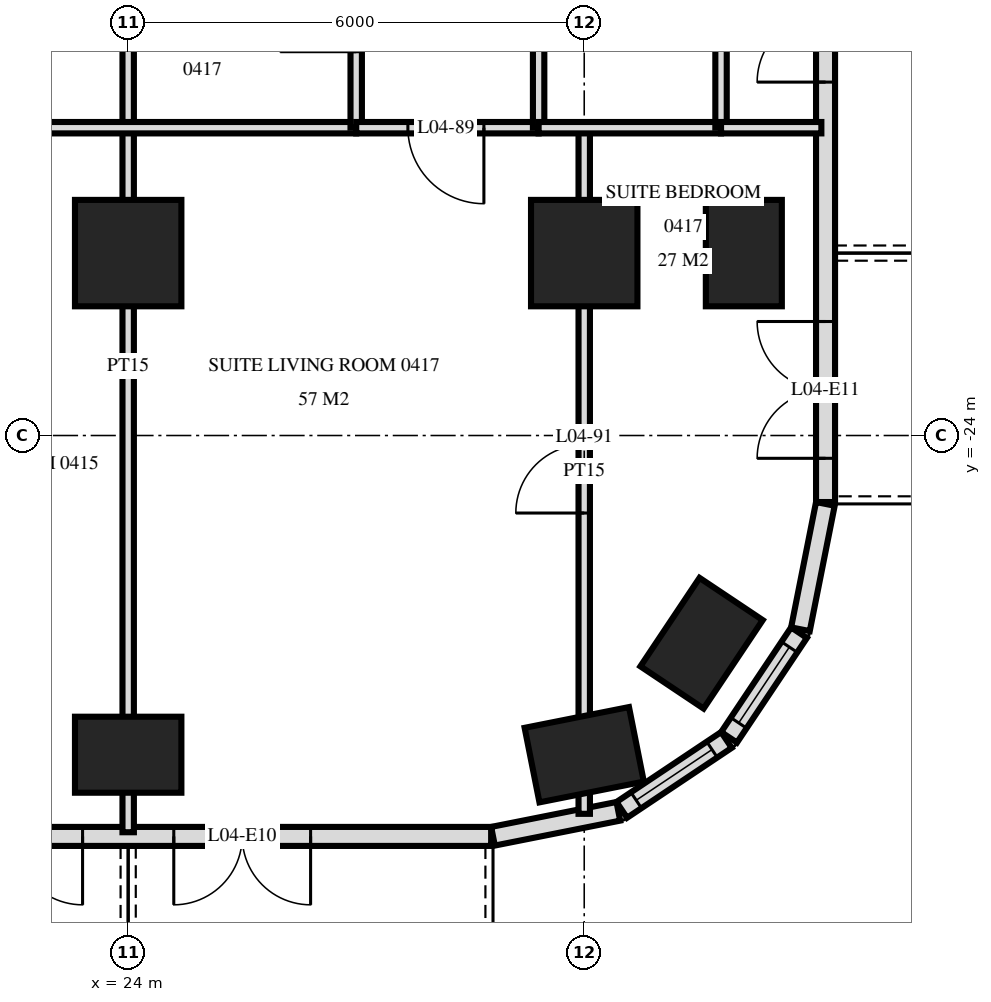
"""IFC4 building model, lengths in metres.
Left out: names, types, materials, properties, quantities, classifications, styles, units other than length and angle.
Written with IfcOpenShell. Run it as: python <this file> out.ifc"""

import sys

from ifc_helpers import new_model, si_unit, direction, frame, frame_2d, origin, origin_2d, place, context, subcontext, project, spatial, rectangle, extrude, element, fill, save


model = new_model("IFC4")
c1 = context("Model", 3, precision=1e-05, world=origin(), true_north=direction((0.0, 1.0)))
c2 = subcontext(c1, "Body", "Model", "MODEL_VIEW")
j1 = project(units=[si_unit("LENGTHUNIT", "METRE"), si_unit("PLANEANGLEUNIT", "RADIAN")], contexts=[c1])
p1 = place(None, origin())
s1 = spatial("IfcSite", under=j1, at=p1, CompositionType="ELEMENT")
p2 = place(p1, origin())
s2 = spatial("IfcBuilding", under=s1, at=p2, CompositionType="ELEMENT")
p3 = place(p2, frame((0.0, 0.0, 24.0)))
s3 = spatial("IfcBuildingStorey", under=s2, at=p3, CompositionType="ELEMENT", Elevation=24.0)
p4 = place(p3, frame((24.0, -28.2, -0.28), z_axis=(0.0, 0.0, 1.0), x_axis=(1.0, 0.0, 0.0)))
e1 = element("IfcColumn", 1, at=p4, inside=s3, PredefinedType="COLUMN", context=c2, shape_type="SweptSolid", body=[
    extrude(rectangle(XDim=1.4, YDim=1.0, at=origin_2d()), origin(), (0.0, 0.0, 1.0), 3.88),
])
p5 = place(p3, frame((24.0, -21.6, -0.28), z_axis=(0.0, 0.0, 1.0), x_axis=(1.0, 0.0, 0.0)))
e2 = element("IfcColumn", 2, at=p5, inside=s3, PredefinedType="COLUMN", context=c2, shape_type="SweptSolid", body=[
    extrude(rectangle(XDim=1.4, YDim=1.4, at=origin_2d()), origin(), (0.0, 0.0, 1.0), 3.88),
])
p6 = place(p3, frame((30.0, -28.2, -0.28), z_axis=(0.0, 0.0, 1.0), x_axis=(0.980792089743, 0.195056086032, 0.0)))
e3 = element("IfcColumn", 3, at=p6, inside=s3, PredefinedType="COLUMN", context=c2, shape_type="SweptSolid", body=[
    extrude(rectangle(XDim=1.4, YDim=1.0, at=origin_2d()), origin(), (0.0, 0.0, 1.0), 3.88),
])
p7 = place(p3, frame((30.0, -21.6, -0.28), z_axis=(0.0, 0.0, 1.0), x_axis=(1.0, 0.0, 0.0)))
e4 = element("IfcColumn", 4, at=p7, inside=s3, PredefinedType="COLUMN", context=c2, shape_type="SweptSolid", body=[
    extrude(rectangle(XDim=1.4, YDim=1.4, at=origin_2d()), origin(), (0.0, 0.0, 1.0), 3.88),
])
for number, where, z_axis, x_axis in (
    (5, (31.544, -26.733, -0.28), (0.0, 0.0, 1.0), (0.556, 0.831, 0.0)),
    (6, (32.1, -21.6, -0.28), (0.0, 0.0, 1.0), (0.0, 1.0, 0.0)),
):
    element("IfcColumn", number, at=place(p3, frame(where, z_axis=z_axis, x_axis=x_axis)), inside=s3, PredefinedType="COLUMN", context=c2, shape_type="SweptSolid", body=[
        extrude(rectangle(XDim=1.4, YDim=1.0, at=origin_2d()), origin(), (0.0, 0.0, 1.0), 3.88),
    ])
p8 = place(p3, frame((-28.775, -29.275, 0.0), z_axis=(0.0, 0.0, 1.0), x_axis=(1.0, 0.0, 0.0)))
e7 = element("IfcWall", 7, at=p8, inside=s3, PredefinedType="SOLIDWALL", context=c2, shape_type="SweptSolid", body=[
    extrude(rectangle(XDim=57.551, YDim=0.25, at=frame_2d((28.775, 0.0))), origin(), (0.0, 0.0, 1.0), 3.32),
])
p9 = place(p8, frame((0.575, 0.0, 0.0)))
e8 = element("IfcOpeningElement", 8, at=p9, cuts=e7, PredefinedType="OPENING", context=c2, shape_type="SweptSolid", body=[
    extrude(rectangle(XDim=1.8, YDim=2.4, at=frame_2d((0.9, 1.2))), frame((0.0, 0.135, 0.0), z_axis=(0.0, -1.0, 0.0), x_axis=(1.0, 0.0, 0.0)), (0.0, 0.0, 1.0), 0.27),
])
p10 = place(p8, frame((5.375, 0.0, 0.0)))
e9 = element("IfcOpeningElement", 9, at=p10, cuts=e7, PredefinedType="OPENING", context=c2, shape_type="SweptSolid", body=[
    extrude(rectangle(XDim=1.8, YDim=2.4, at=frame_2d((0.9, 1.2))), frame((0.0, 0.135, 0.0), z_axis=(0.0, -1.0, 0.0), x_axis=(1.0, 0.0, 0.0)), (0.0, 0.0, 1.0), 0.27),
])
p11 = place(p8, frame((8.075, 0.0, 0.3)))
e10 = element("IfcOpeningElement", 10, at=p11, cuts=e7, PredefinedType="OPENING", context=c2, shape_type="SweptSolid", body=[
    extrude(rectangle(XDim=2.4, YDim=2.1, at=frame_2d((1.2, 1.05))), frame((0.0, 0.135, 0.0), z_axis=(0.0, -1.0, 0.0), x_axis=(1.0, 0.0, 0.0)), (0.0, 0.0, 1.0), 0.27),
])
p12 = place(p8, frame((11.375, 0.0, 0.0)))
e11 = element("IfcOpeningElement", 11, at=p12, cuts=e7, PredefinedType="OPENING", context=c2, shape_type="SweptSolid", body=[
    extrude(rectangle(XDim=1.8, YDim=2.4, at=frame_2d((0.9, 1.2))), frame((0.0, 0.135, 0.0), z_axis=(0.0, -1.0, 0.0), x_axis=(1.0, 0.0, 0.0)), (0.0, 0.0, 1.0), 0.27),
])
p13 = place(p8, frame((14.075, 0.0, 0.3)))
e12 = element("IfcOpeningElement", 12, at=p13, cuts=e7, PredefinedType="OPENING", context=c2, shape_type="SweptSolid", body=[
    extrude(rectangle(XDim=2.4, YDim=2.1, at=frame_2d((1.2, 1.05))), frame((0.0, 0.135, 0.0), z_axis=(0.0, -1.0, 0.0), x_axis=(1.0, 0.0, 0.0)), (0.0, 0.0, 1.0), 0.27),
])
p14 = place(p8, frame((17.375, 0.0, 0.0)))
e13 = element("IfcOpeningElement", 13, at=p14, cuts=e7, PredefinedType="OPENING", context=c2, shape_type="SweptSolid", body=[
    extrude(rectangle(XDim=1.8, YDim=2.4, at=frame_2d((0.9, 1.2))), frame((0.0, 0.135, 0.0), z_axis=(0.0, -1.0, 0.0), x_axis=(1.0, 0.0, 0.0)), (0.0, 0.0, 1.0), 0.27),
])
p15 = place(p8, frame((20.075, 0.0, 0.3)))
e14 = element("IfcOpeningElement", 14, at=p15, cuts=e7, PredefinedType="OPENING", context=c2, shape_type="SweptSolid", body=[
    extrude(rectangle(XDim=2.4, YDim=2.1, at=frame_2d((1.2, 1.05))), frame((0.0, 0.135, 0.0), z_axis=(0.0, -1.0, 0.0), x_axis=(1.0, 0.0, 0.0)), (0.0, 0.0, 1.0), 0.27),
])
p16 = place(p8, frame((23.075, 0.0, 0.3)))
e15 = element("IfcOpeningElement", 15, at=p16, cuts=e7, PredefinedType="OPENING", context=c2, shape_type="SweptSolid", body=[
    extrude(rectangle(XDim=2.4, YDim=2.1, at=frame_2d((1.2, 1.05))), frame((0.0, 0.135, 0.0), z_axis=(0.0, -1.0, 0.0), x_axis=(1.0, 0.0, 0.0)), (0.0, 0.0, 1.0), 0.27),
])
p17 = place(p8, frame((26.375, 0.0, 0.0)))
e16 = element("IfcOpeningElement", 16, at=p17, cuts=e7, PredefinedType="OPENING", context=c2, shape_type="SweptSolid", body=[
    extrude(rectangle(XDim=1.8, YDim=2.4, at=frame_2d((0.9, 1.2))), frame((0.0, 0.135, 0.0), z_axis=(0.0, -1.0, 0.0), x_axis=(1.0, 0.0, 0.0)), (0.0, 0.0, 1.0), 0.27),
])
p18 = place(p8, frame((29.375, 0.0, 0.0)))
e17 = element("IfcOpeningElement", 17, at=p18, cuts=e7, PredefinedType="OPENING", context=c2, shape_type="SweptSolid", body=[
    extrude(rectangle(XDim=1.8, YDim=2.4, at=frame_2d((0.9, 1.2))), frame((0.0, 0.135, 0.0), z_axis=(0.0, -1.0, 0.0), x_axis=(1.0, 0.0, 0.0)), (0.0, 0.0, 1.0), 0.27),
])
p19 = place(p8, frame((32.075, 0.0, 0.3)))
e18 = element("IfcOpeningElement", 18, at=p19, cuts=e7, PredefinedType="OPENING", context=c2, shape_type="SweptSolid", body=[
    extrude(rectangle(XDim=2.4, YDim=2.1, at=frame_2d((1.2, 1.05))), frame((0.0, 0.135, 0.0), z_axis=(0.0, -1.0, 0.0), x_axis=(1.0, 0.0, 0.0)), (0.0, 0.0, 1.0), 0.27),
])
p20 = place(p8, frame((35.375, 0.0, 0.0)))
e19 = element("IfcOpeningElement", 19, at=p20, cuts=e7, PredefinedType="OPENING", context=c2, shape_type="SweptSolid", body=[
    extrude(rectangle(XDim=1.8, YDim=2.4, at=frame_2d((0.9, 1.2))), frame((0.0, 0.135, 0.0), z_axis=(0.0, -1.0, 0.0), x_axis=(1.0, 0.0, 0.0)), (0.0, 0.0, 1.0), 0.27),
])
p21 = place(p8, frame((38.075, 0.0, 0.3)))
e20 = element("IfcOpeningElement", 20, at=p21, cuts=e7, PredefinedType="OPENING", context=c2, shape_type="SweptSolid", body=[
    extrude(rectangle(XDim=2.4, YDim=2.1, at=frame_2d((1.2, 1.05))), frame((0.0, 0.135, 0.0), z_axis=(0.0, -1.0, 0.0), x_axis=(1.0, 0.0, 0.0)), (0.0, 0.0, 1.0), 0.27),
])
p22 = place(p8, frame((41.375, 0.0, 0.0)))
e21 = element("IfcOpeningElement", 21, at=p22, cuts=e7, PredefinedType="OPENING", context=c2, shape_type="SweptSolid", body=[
    extrude(rectangle(XDim=1.8, YDim=2.4, at=frame_2d((0.9, 1.2))), frame((0.0, 0.135, 0.0), z_axis=(0.0, -1.0, 0.0), x_axis=(1.0, 0.0, 0.0)), (0.0, 0.0, 1.0), 0.27),
])
p23 = place(p8, frame((44.075, 0.0, 0.3)))
e22 = element("IfcOpeningElement", 22, at=p23, cuts=e7, PredefinedType="OPENING", context=c2, shape_type="SweptSolid", body=[
    extrude(rectangle(XDim=2.4, YDim=2.1, at=frame_2d((1.2, 1.05))), frame((0.0, 0.135, 0.0), z_axis=(0.0, -1.0, 0.0), x_axis=(1.0, 0.0, 0.0)), (0.0, 0.0, 1.0), 0.27),
])
p24 = place(p8, frame((47.075, 0.0, 0.3)))
e23 = element("IfcOpeningElement", 23, at=p24, cuts=e7, PredefinedType="OPENING", context=c2, shape_type="SweptSolid", body=[
    extrude(rectangle(XDim=2.4, YDim=2.1, at=frame_2d((1.2, 1.05))), frame((0.0, 0.135, 0.0), z_axis=(0.0, -1.0, 0.0), x_axis=(1.0, 0.0, 0.0)), (0.0, 0.0, 1.0), 0.27),
])
p25 = place(p8, frame((50.375, 0.0, 0.0)))
e24 = element("IfcOpeningElement", 24, at=p25, cuts=e7, PredefinedType="OPENING", context=c2, shape_type="SweptSolid", body=[
    extrude(rectangle(XDim=1.8, YDim=2.4, at=frame_2d((0.9, 1.2))), frame((0.0, 0.135, 0.0), z_axis=(0.0, -1.0, 0.0), x_axis=(1.0, 0.0, 0.0)), (0.0, 0.0, 1.0), 0.27),
])
p26 = place(p8, frame((53.375, 0.0, 0.0)))
e25 = element("IfcOpeningElement", 25, at=p26, cuts=e7, PredefinedType="OPENING", context=c2, shape_type="SweptSolid", body=[
    extrude(rectangle(XDim=1.8, YDim=2.4, at=frame_2d((0.9, 1.2))), frame((0.0, 0.135, 0.0), z_axis=(0.0, -1.0, 0.0), x_axis=(1.0, 0.0, 0.0)), (0.0, 0.0, 1.0), 0.27),
])
p27 = place(p3, frame((28.8, -29.273, 0.0), z_axis=(0.0, 0.0, 1.0), x_axis=(0.980775640221, 0.19513878023, 0.0)))
e26 = element("IfcWall", 26, at=p27, inside=s3, PredefinedType="SOLIDWALL", context=c2, shape_type="SweptSolid", body=[
    extrude(rectangle(XDim=1.681, YDim=0.25, at=frame_2d((0.841, 0.0))), origin(), (0.0, 0.0, 1.0), 3.32),
])
p28 = place(p3, frame((30.494, -28.926, 0.0), z_axis=(0.0, 0.0, 1.0), x_axis=(0.831482937015, 0.55555029066, 0.0)))
e27 = element("IfcWall", 27, at=p28, inside=s3, PredefinedType="SOLIDWALL", context=c2, shape_type="SweptSolid", body=[
    extrude(rectangle(XDim=1.656, YDim=0.25, at=frame_2d((0.828, 0.0))), origin(), (0.0, 0.0, 1.0), 3.32),
])
p29 = place(p28, frame((0.228, 0.0, 0.9)))
e28 = element("IfcOpeningElement", 28, at=p29, cuts=e27, PredefinedType="OPENING", context=c2, shape_type="SweptSolid", body=[
    extrude(rectangle(XDim=1.2, YDim=1.5, at=frame_2d((0.6, 0.75))), frame((0.0, 0.135, 0.0), z_axis=(0.0, -1.0, 0.0), x_axis=(1.0, 0.0, 0.0)), (0.0, 0.0, 1.0), 0.27),
])
p30 = place(p3, frame((31.906, -27.971, 0.0), z_axis=(0.0, 0.0, 1.0), x_axis=(0.55555029066, 0.831482937015, 0.0)))
e29 = element("IfcWall", 29, at=p30, inside=s3, PredefinedType="SOLIDWALL", context=c2, shape_type="SweptSolid", body=[
    extrude(rectangle(XDim=1.656, YDim=0.25, at=frame_2d((0.828, 0.0))), origin(), (0.0, 0.0, 1.0), 3.32),
])
p31 = place(p30, frame((0.228, 0.0, 0.9)))
e30 = element("IfcOpeningElement", 30, at=p31, cuts=e29, PredefinedType="OPENING", context=c2, shape_type="SweptSolid", body=[
    extrude(rectangle(XDim=1.2, YDim=1.5, at=frame_2d((0.6, 0.75))), frame((0.0, 0.135, 0.0), z_axis=(0.0, -1.0, 0.0), x_axis=(1.0, 0.0, 0.0)), (0.0, 0.0, 1.0), 0.27),
])
p32 = place(p3, frame((32.844, -26.549, 0.0), z_axis=(0.0, 0.0, 1.0), x_axis=(0.195166572128, 0.980770110232, 0.0)))
e31 = element("IfcWall", 31, at=p32, inside=s3, PredefinedType="SOLIDWALL", context=c2, shape_type="SweptSolid", body=[
    extrude(rectangle(XDim=1.681, YDim=0.25, at=frame_2d((0.841, 0.0))), origin(), (0.0, 0.0, 1.0), 3.32),
])
p33 = place(p3, frame((33.175, -24.875, 0.0), z_axis=(0.0, 0.0, 1.0), x_axis=(0.0, 1.0, 0.0)))
e32 = element("IfcWall", 32, at=p33, inside=s3, PredefinedType="SOLIDWALL", context=c2, shape_type="SweptSolid", body=[
    extrude(rectangle(XDim=21.551, YDim=0.25, at=frame_2d((10.775, 0.0))), origin(), (0.0, 0.0, 1.0), 3.32),
])
p34 = place(p33, frame((0.575, 0.0, 0.0)))
e33 = element("IfcOpeningElement", 33, at=p34, cuts=e32, PredefinedType="OPENING", context=c2, shape_type="SweptSolid", body=[
    extrude(rectangle(XDim=1.8, YDim=2.4, at=frame_2d((0.9, 1.2))), frame((0.0, 0.135, 0.0), z_axis=(0.0, -1.0, 0.0), x_axis=(1.0, 0.0, 0.0)), (0.0, 0.0, 1.0), 0.27),
])
p35 = place(p33, frame((5.525, 0.0, 0.0)))
e34 = element("IfcOpeningElement", 34, at=p35, cuts=e32, PredefinedType="OPENING", context=c2, shape_type="SweptSolid", body=[
    extrude(rectangle(XDim=1.8, YDim=2.4, at=frame_2d((0.9, 1.2))), frame((0.0, 0.135, 0.0), z_axis=(0.0, -1.0, 0.0), x_axis=(1.0, 0.0, 0.0)), (0.0, 0.0, 1.0), 0.27),
])
p36 = place(p33, frame((12.725, 0.0, 0.0)))
e35 = element("IfcOpeningElement", 35, at=p36, cuts=e32, PredefinedType="OPENING", context=c2, shape_type="SweptSolid", body=[
    extrude(rectangle(XDim=1.8, YDim=2.4, at=frame_2d((0.9, 1.2))), frame((0.0, 0.135, 0.0), z_axis=(0.0, -1.0, 0.0), x_axis=(1.0, 0.0, 0.0)), (0.0, 0.0, 1.0), 0.27),
])
p37 = place(p3, frame((31.8, -19.95, 0.0), z_axis=(0.0, 0.0, 1.0), x_axis=(0.0, 1.0, 0.0)))
e36 = element("IfcWall", 36, at=p37, inside=s3, PredefinedType="PLUMBINGWALL", context=c2, shape_type="SweptSolid", body=[
    extrude(rectangle(XDim=3.0, YDim=0.15, at=frame_2d((1.5, 0.0))), origin(), (0.0, 0.0, 1.0), 3.32),
])
p38 = place(p37, frame((1.12, 0.0, 0.0)))
e37 = element("IfcOpeningElement", 37, at=p38, cuts=e36, PredefinedType="OPENING", context=c2, shape_type="SweptSolid", body=[
    extrude(rectangle(XDim=0.8, YDim=2.1, at=frame_2d((0.4, 1.05))), frame((0.0, 0.085, 0.0), z_axis=(0.0, -1.0, 0.0), x_axis=(1.0, 0.0, 0.0)), (0.0, 0.0, 1.0), 0.17),
])
p39 = place(p3, frame((30.0, -28.978, 0.0), z_axis=(0.0, 0.0, 1.0), x_axis=(0.0, 1.0, 0.0)))
e38 = element("IfcWall", 38, at=p39, inside=s3, PredefinedType="PARTITIONING", context=c2, shape_type="SweptSolid", body=[
    extrude(rectangle(XDim=9.028, YDim=0.15, at=frame_2d((4.514, 0.0))), origin(), (0.0, 0.0, 1.0), 3.32),
])
p40 = place(p39, frame((3.958, 0.0, 0.0)))
e39 = element("IfcOpeningElement", 39, at=p40, cuts=e38, PredefinedType="OPENING", context=c2, shape_type="SweptSolid", body=[
    extrude(rectangle(XDim=0.9, YDim=2.1, at=frame_2d((0.45, 1.05))), frame((0.0, 0.085, 0.0), z_axis=(0.0, -1.0, 0.0), x_axis=(1.0, 0.0, 0.0)), (0.0, 0.0, 1.0), 0.17),
])
p41 = place(p3, frame((29.4, -19.95, 0.0), z_axis=(0.0, 0.0, 1.0), x_axis=(0.0, 1.0, 0.0)))
e40 = element("IfcWall", 40, at=p41, inside=s3, PredefinedType="PARTITIONING", context=c2, shape_type="SweptSolid", body=[
    extrude(rectangle(XDim=3.0, YDim=0.15, at=frame_2d((1.5, 0.0))), origin(), (0.0, 0.0, 1.0), 3.32),
])
p42 = place(p41, frame((1.02, 0.0, 0.0)))
e41 = element("IfcOpeningElement", 41, at=p42, cuts=e40, PredefinedType="OPENING", context=c2, shape_type="SweptSolid", body=[
    extrude(rectangle(XDim=1.0, YDim=2.1, at=frame_2d((0.5, 1.05))), frame((0.0, 0.085, 0.0), z_axis=(0.0, -1.0, 0.0), x_axis=(1.0, 0.0, 0.0)), (0.0, 0.0, 1.0), 0.17),
])
p43 = place(p3, frame((27.0, -19.95, 0.0), z_axis=(0.0, 0.0, 1.0), x_axis=(0.0, 1.0, 0.0)))
e42 = element("IfcWall", 42, at=p43, inside=s3, PredefinedType="PARTITIONING", context=c2, shape_type="SweptSolid", body=[
    extrude(rectangle(XDim=3.0, YDim=0.15, at=frame_2d((1.5, 0.0))), origin(), (0.0, 0.0, 1.0), 3.32),
])
p44 = place(p43, frame((1.0, 0.0, 0.0)))
e43 = element("IfcOpeningElement", 43, at=p44, cuts=e42, PredefinedType="OPENING", context=c2, shape_type="SweptSolid", body=[
    extrude(rectangle(XDim=1.0, YDim=2.1, at=frame_2d((0.5, 1.05))), frame((0.0, 0.085, 0.0), z_axis=(0.0, -1.0, 0.0), x_axis=(1.0, 0.0, 0.0)), (0.0, 0.0, 1.0), 0.17),
])
p45 = place(p3, frame((24.0, -29.22, 0.0), z_axis=(0.0, 0.0, 1.0), x_axis=(0.0, 1.0, 0.0)))
e44 = element("IfcWall", 44, at=p45, inside=s3, PredefinedType="PARTITIONING", context=c2, shape_type="SweptSolid", body=[
    extrude(rectangle(XDim=12.27, YDim=0.15, at=frame_2d((6.135, 0.0))), origin(), (0.0, 0.0, 1.0), 3.32),
])
p46 = place(p3, frame((27.0, -19.95, 0.0), z_axis=(0.0, 0.0, 1.0), x_axis=(1.0, 0.0, 0.0)))
e45 = element("IfcWall", 45, at=p46, inside=s3, PredefinedType="PARTITIONING", context=c2, shape_type="SweptSolid", body=[
    extrude(rectangle(XDim=2.4, YDim=0.15, at=frame_2d((1.2, 0.0))), origin(), (0.0, 0.0, 1.0), 3.32),
])
p47 = place(p46, frame((0.68, 0.0, 0.0)))
e46 = element("IfcOpeningElement", 46, at=p47, cuts=e45, PredefinedType="OPENING", context=c2, shape_type="SweptSolid", body=[
    extrude(rectangle(XDim=1.0, YDim=2.1, at=frame_2d((0.5, 1.05))), frame((0.0, 0.085, 0.0), z_axis=(0.0, -1.0, 0.0), x_axis=(1.0, 0.0, 0.0)), (0.0, 0.0, 1.0), 0.17),
])
p48 = place(p3, frame((22.3, -19.95, 0.0), z_axis=(0.0, 0.0, 1.0), x_axis=(1.0, 0.0, 0.0)))
e47 = element("IfcWall", 47, at=p48, inside=s3, PredefinedType="PARTITIONING", context=c2, shape_type="SweptSolid", body=[
    extrude(rectangle(XDim=4.7, YDim=0.15, at=frame_2d((2.35, 0.0))), origin(), (0.0, 0.0, 1.0), 3.32),
])
p49 = place(p3, frame((29.4, -19.95, 0.0), z_axis=(0.0, 0.0, 1.0), x_axis=(1.0, 0.0, 0.0)))
e48 = element("IfcWall", 48, at=p49, inside=s3, PredefinedType="PARTITIONING", context=c2, shape_type="SweptSolid", body=[
    extrude(rectangle(XDim=2.4, YDim=0.15, at=frame_2d((1.2, 0.0))), origin(), (0.0, 0.0, 1.0), 3.32),
])
p50 = place(p3, frame((31.8, -19.95, 0.0), z_axis=(0.0, 0.0, 1.0), x_axis=(1.0, 0.0, 0.0)))
e49 = element("IfcWall", 49, at=p50, inside=s3, PredefinedType="PLUMBINGWALL", context=c2, shape_type="SweptSolid", body=[
    extrude(rectangle(XDim=1.32, YDim=0.15, at=frame_2d((0.66, 0.0))), origin(), (0.0, 0.0, 1.0), 3.32),
])
p51 = place(p29, origin())
e50 = element("IfcWindow", 50, at=p51, inside=s3, PartitioningType="SINGLE_PANEL", PredefinedType="WINDOW", context=c2, shape_type="SweptSolid", body=[
    extrude(rectangle(XDim=1.2, YDim=1.5, at=frame_2d((0.6, 0.75))), frame((0.0, 0.03, 0.0), z_axis=(0.0, -1.0, 0.0), x_axis=(1.0, 0.0, 0.0)), (0.0, 0.0, 1.0), 0.06),
])
fill(e28, e50)
p52 = place(p31, origin())
e51 = element("IfcWindow", 51, at=p52, inside=s3, PartitioningType="SINGLE_PANEL", PredefinedType="WINDOW", context=c2, shape_type="SweptSolid", body=[
    extrude(rectangle(XDim=1.2, YDim=1.5, at=frame_2d((0.6, 0.75))), frame((0.0, 0.03, 0.0), z_axis=(0.0, -1.0, 0.0), x_axis=(1.0, 0.0, 0.0)), (0.0, 0.0, 1.0), 0.06),
])
fill(e30, e51)
p53 = place(p25, frame((0.9, 0.0, 0.0), z_axis=(0.0, 0.0, 1.0), x_axis=(-1.0, 0.0, 0.0)))
e52 = element("IfcDoor", 52, at=p53, inside=s3, OperationType="DOUBLE_DOOR_SINGLE_SWING", PredefinedType="DOOR", context=c2, shape_type="SweptSolid", body=[
    extrude(rectangle(XDim=1.8, YDim=2.4, at=frame_2d((0.0, 1.2))), frame((0.0, -0.025, 0.0), z_axis=(0.0, 1.0, 0.0), x_axis=(-1.0, 0.0, 0.0)), (0.0, 0.0, 1.0), 0.05),
])
fill(e24, e52)
p54 = place(p26, frame((0.9, 0.0, 0.0), z_axis=(0.0, 0.0, 1.0), x_axis=(-1.0, 0.0, 0.0)))
e53 = element("IfcDoor", 53, at=p54, inside=s3, OperationType="DOUBLE_DOOR_SINGLE_SWING", PredefinedType="DOOR", context=c2, shape_type="SweptSolid", body=[
    extrude(rectangle(XDim=1.8, YDim=2.4, at=frame_2d((0.0, 1.2))), frame((0.0, -0.025, 0.0), z_axis=(0.0, 1.0, 0.0), x_axis=(-1.0, 0.0, 0.0)), (0.0, 0.0, 1.0), 0.05),
])
fill(e25, e53)
p55 = place(p34, origin())
e54 = element("IfcDoor", 54, at=p55, inside=s3, OperationType="DOUBLE_DOOR_SINGLE_SWING", PredefinedType="DOOR", context=c2, shape_type="SweptSolid", body=[
    extrude(rectangle(XDim=1.8, YDim=2.4, at=frame_2d((0.9, 1.2))), frame((0.0, 0.025, 0.0), z_axis=(0.0, -1.0, 0.0), x_axis=(1.0, 0.0, 0.0)), (0.0, 0.0, 1.0), 0.05),
])
fill(e33, e54)
p56 = place(p35, origin())
e55 = element("IfcDoor", 55, at=p56, inside=s3, OperationType="DOUBLE_DOOR_SINGLE_SWING", PredefinedType="DOOR", context=c2, shape_type="SweptSolid", body=[
    extrude(rectangle(XDim=1.8, YDim=2.4, at=frame_2d((0.9, 1.2))), frame((0.0, 0.025, 0.0), z_axis=(0.0, -1.0, 0.0), x_axis=(1.0, 0.0, 0.0)), (0.0, 0.0, 1.0), 0.05),
])
fill(e34, e55)
p57 = place(p47, frame((0.5, 0.0, 0.0), z_axis=(0.0, 0.0, 1.0), x_axis=(-1.0, 0.0, 0.0)))
e56 = element("IfcDoor", 56, at=p57, inside=s3, OperationType="SINGLE_SWING_RIGHT", PredefinedType="DOOR", context=c2, shape_type="SweptSolid", body=[
    extrude(rectangle(XDim=1.0, YDim=2.1, at=frame_2d((0.0, 1.05))), frame((0.0, -0.025, 0.0), z_axis=(0.0, 1.0, 0.0), x_axis=(-1.0, 0.0, 0.0)), (0.0, 0.0, 1.0), 0.05),
])
fill(e46, e56)
p58 = place(p40, origin())
e57 = element("IfcDoor", 57, at=p58, inside=s3, OperationType="SINGLE_SWING_RIGHT", PredefinedType="DOOR", context=c2, shape_type="SweptSolid", body=[
    extrude(rectangle(XDim=0.9, YDim=2.1, at=frame_2d((0.45, 1.05))), frame((0.0, 0.025, 0.0), z_axis=(0.0, -1.0, 0.0), x_axis=(1.0, 0.0, 0.0)), (0.0, 0.0, 1.0), 0.05),
])
fill(e39, e57)
save(model, sys.argv[1])
